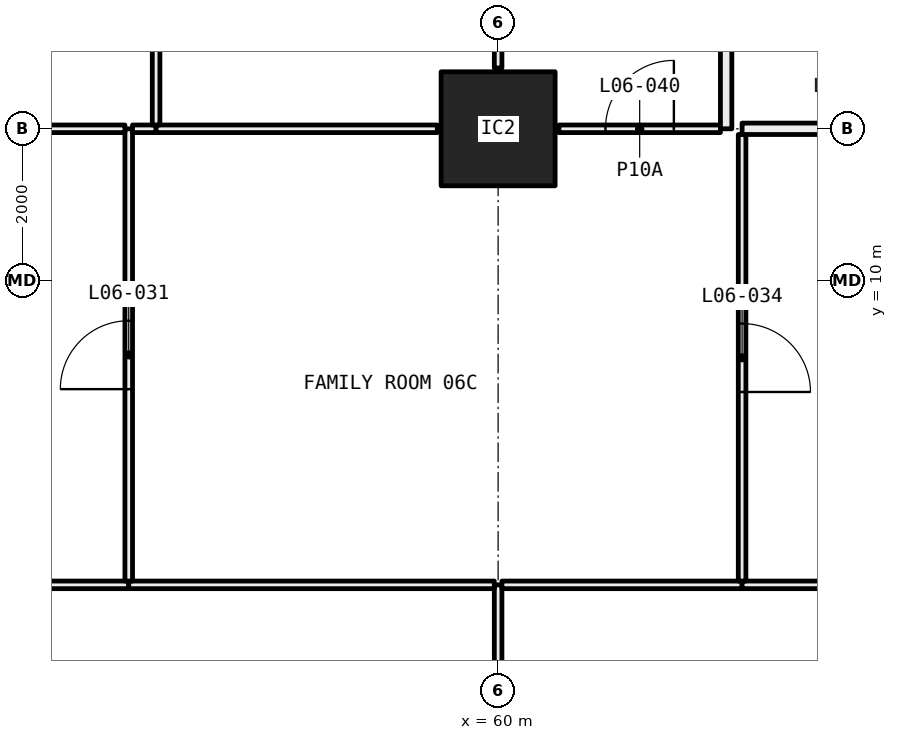
"""IFC4 building model, lengths in metres.
Left out: names, types, materials, properties, quantities, classifications, styles, units other than length and angle.
Written with IfcOpenShell. Run it as: python <this file> out.ifc"""

import sys

from ifc_helpers import new_model, si_unit, direction, frame, frame_2d, origin, origin_2d, place, context, subcontext, project, spatial, rectangle, hollow_rectangle, extrude, element, fill, save


model = new_model("IFC4")
c1 = context("Model", 3, precision=1e-05, world=origin(), true_north=direction((0.0, 1.0)))
c2 = subcontext(c1, "Body", "Model", "MODEL_VIEW")
j1 = project(units=[si_unit("LENGTHUNIT", "METRE"), si_unit("PLANEANGLEUNIT", "RADIAN")], contexts=[c1])
p1 = place(None, origin())
s1 = spatial("IfcSite", under=j1, at=p1, CompositionType="ELEMENT")
p2 = place(p1, origin())
s2 = spatial("IfcBuilding", under=s1, at=p2, CompositionType="ELEMENT")
p3 = place(p2, frame((0.0, 0.0, 33.45)))
s3 = spatial("IfcBuildingStorey", under=s2, at=p3, CompositionType="ELEMENT", Elevation=33.45)
p4 = place(p3, frame((60.0, 12.0, 0.0), z_axis=(0.0, 0.0, 1.0), x_axis=(1.0, 0.0, 0.0)))
e1 = element("IfcColumn", 1, at=p4, inside=s3, PredefinedType="COLUMN", context=c2, shape_type="SweptSolid", body=[
    extrude(hollow_rectangle(XDim=1.5, YDim=1.5, WallThickness=0.065, at=origin_2d()), origin(), (0.0, 0.0, 1.0), 3.05),
])
p5 = place(p3, frame((60.0, 0.72, 0.0), z_axis=(0.0, 0.0, 1.0), x_axis=(0.0, 1.0, 0.0)))
e2 = element("IfcWall", 2, at=p5, inside=s3, PredefinedType="PARTITIONING", context=c2, shape_type="SweptSolid", body=[
    extrude(rectangle(XDim=5.28, YDim=0.1, at=frame_2d((2.64, 0.0))), origin(), (0.0, 0.0, 1.0), 2.45),
])
p6 = place(p5, frame((2.19, 0.0, 0.0)))
e3 = element("IfcOpeningElement", 3, at=p6, cuts=e2, PredefinedType="OPENING", context=c2, shape_type="SweptSolid", body=[
    extrude(rectangle(XDim=0.9, YDim=2.1, at=frame_2d((0.45, 1.05))), frame((0.0, 0.06, 0.0), z_axis=(0.0, -1.0, 0.0), x_axis=(1.0, 0.0, 0.0)), (0.0, 0.0, 1.0), 0.12),
])
p7 = place(p3, frame((55.14, 6.0, 0.0), z_axis=(0.0, 0.0, 1.0), x_axis=(-1.0, 0.0, 0.0)))
e4 = element("IfcWall", 4, at=p7, inside=s3, PredefinedType="PARTITIONING", context=c2, shape_type="SweptSolid", body=[
    extrude(rectangle(XDim=7.09, YDim=0.1, at=frame_2d((3.545, 0.0))), origin(), (0.0, 0.0, 1.0), 2.45),
])
p8 = place(p7, frame((3.095, 0.0, 0.0)))
e5 = element("IfcOpeningElement", 5, at=p8, cuts=e4, PredefinedType="OPENING", context=c2, shape_type="SweptSolid", body=[
    extrude(rectangle(XDim=0.9, YDim=2.1, at=frame_2d((0.45, 1.05))), frame((0.0, 0.06, 0.0), z_axis=(0.0, -1.0, 0.0), x_axis=(1.0, 0.0, 0.0)), (0.0, 0.0, 1.0), 0.12),
])
p9 = place(p3, frame((59.95, 6.0, 0.0), z_axis=(0.0, 0.0, 1.0), x_axis=(-1.0, 0.0, 0.0)))
e6 = element("IfcWall", 6, at=p9, inside=s3, PredefinedType="PARTITIONING", context=c2, shape_type="SweptSolid", body=[
    extrude(rectangle(XDim=4.81, YDim=0.1, at=frame_2d((2.405, 0.0))), origin(), (0.0, 0.0, 1.0), 2.45),
])
p10 = place(p3, frame((63.21, 6.0, 0.0), z_axis=(0.0, 0.0, 1.0), x_axis=(-1.0, 0.0, 0.0)))
e7 = element("IfcWall", 7, at=p10, inside=s3, PredefinedType="PARTITIONING", context=c2, shape_type="SweptSolid", body=[
    extrude(rectangle(XDim=3.16, YDim=0.1, at=frame_2d((1.58, 0.0))), origin(), (0.0, 0.0, 1.0), 2.45),
])
p11 = place(p3, frame((65.28, 6.0, 0.0), z_axis=(0.0, 0.0, 1.0), x_axis=(-1.0, 0.0, 0.0)))
e8 = element("IfcWall", 8, at=p11, inside=s3, PredefinedType="PARTITIONING", context=c2, shape_type="SweptSolid", body=[
    extrude(rectangle(XDim=2.07, YDim=0.1, at=frame_2d((1.035, 0.0))), origin(), (0.0, 0.0, 1.0), 3.05),
])
p12 = place(p3, frame((55.14, 6.05, 0.0), z_axis=(0.0, 0.0, 1.0), x_axis=(0.0, 1.0, 0.0)))
e9 = element("IfcWall", 9, at=p12, inside=s3, PredefinedType="PARTITIONING", context=c2, shape_type="SweptSolid", body=[
    extrude(rectangle(XDim=5.95, YDim=0.1, at=frame_2d((2.975, 0.0))), origin(), (0.0, 0.0, 1.0), 2.45),
])
p13 = place(p12, frame((2.525, 0.0, 0.0)))
e10 = element("IfcOpeningElement", 10, at=p13, cuts=e9, PredefinedType="OPENING", context=c2, shape_type="SweptSolid", body=[
    extrude(rectangle(XDim=0.9, YDim=2.1, at=frame_2d((0.45, 1.05))), frame((0.0, 0.06, 0.0), z_axis=(0.0, -1.0, 0.0), x_axis=(1.0, 0.0, 0.0)), (0.0, 0.0, 1.0), 0.12),
])
p14 = place(p3, frame((55.09, 12.0, 0.0), z_axis=(0.0, 0.0, 1.0), x_axis=(-1.0, 0.0, 0.0)))
e11 = element("IfcWall", 11, at=p14, inside=s3, PredefinedType="PARTITIONING", context=c2, shape_type="SweptSolid", body=[
    extrude(rectangle(XDim=4.09, YDim=0.1, at=frame_2d((2.045, 0.0))), origin(), (0.0, 0.0, 1.0), 2.45),
])
p15 = place(p14, frame((1.595, 0.0, 0.0)))
e12 = element("IfcOpeningElement", 12, at=p15, cuts=e11, PredefinedType="OPENING", context=c2, shape_type="SweptSolid", body=[
    extrude(rectangle(XDim=0.9, YDim=2.1, at=frame_2d((0.45, 1.05))), frame((0.0, 0.06, 0.0), z_axis=(0.0, -1.0, 0.0), x_axis=(1.0, 0.0, 0.0)), (0.0, 0.0, 1.0), 0.12),
])
p16 = place(p3, frame((63.21, 6.05, 0.0), z_axis=(0.0, 0.0, 1.0), x_axis=(0.0, 1.0, 0.0)))
e13 = element("IfcWall", 13, at=p16, inside=s3, PredefinedType="PARTITIONING", context=c2, shape_type="SweptSolid", body=[
    extrude(rectangle(XDim=5.875, YDim=0.1, at=frame_2d((2.938, 0.0))), origin(), (0.0, 0.0, 1.0), 2.45),
])
p17 = place(p16, frame((2.488, 0.0, 0.0)))
e14 = element("IfcOpeningElement", 14, at=p17, cuts=e13, PredefinedType="OPENING", context=c2, shape_type="SweptSolid", body=[
    extrude(rectangle(XDim=0.9, YDim=2.1, at=frame_2d((0.45, 1.05))), frame((0.0, 0.06, 0.0), z_axis=(0.0, -1.0, 0.0), x_axis=(1.0, 0.0, 0.0)), (0.0, 0.0, 1.0), 0.12),
])
p18 = place(p3, frame((55.5, 12.0, 0.0), z_axis=(0.0, 0.0, 1.0), x_axis=(-1.0, 0.0, 0.0)))
e15 = element("IfcWall", 15, at=p18, inside=s3, PredefinedType="PARTITIONING", context=c2, shape_type="SweptSolid", body=[
    extrude(rectangle(XDim=0.31, YDim=0.1, at=frame_2d((0.155, 0.0))), origin(), (0.0, 0.0, 1.0), 2.45),
])
p19 = place(p3, frame((59.2, 12.0, 0.0), z_axis=(0.0, 0.0, 1.0), x_axis=(-1.0, 0.0, 0.0)))
e16 = element("IfcWall", 16, at=p19, inside=s3, PredefinedType="PARTITIONING", context=c2, shape_type="SweptSolid", body=[
    extrude(rectangle(XDim=3.7, YDim=0.1, at=frame_2d((1.85, 0.0))), origin(), (0.0, 0.0, 1.0), 2.45),
])
p20 = place(p3, frame((62.925, 12.0, 0.0), z_axis=(0.0, 0.0, 1.0), x_axis=(-1.0, 0.0, 0.0)))
e17 = element("IfcWall", 17, at=p20, inside=s3, PredefinedType="PARTITIONING", context=c2, shape_type="SweptSolid", body=[
    extrude(rectangle(XDim=2.125, YDim=0.1, at=frame_2d((1.062, 0.0))), origin(), (0.0, 0.0, 1.0), 2.45),
])
p21 = place(p20, frame((0.613, 0.0, 0.0)))
e18 = element("IfcOpeningElement", 18, at=p21, cuts=e17, PredefinedType="OPENING", context=c2, shape_type="SweptSolid", body=[
    extrude(rectangle(XDim=0.9, YDim=2.1, at=frame_2d((0.45, 1.05))), frame((0.0, 0.06, 0.0), z_axis=(0.0, -1.0, 0.0), x_axis=(1.0, 0.0, 0.0)), (0.0, 0.0, 1.0), 0.12),
])
p22 = place(p3, frame((66.146, 12.0, 0.0), z_axis=(0.0, 0.0, 1.0), x_axis=(-1.0, 0.0, 0.0)))
e19 = element("IfcWall", 19, at=p22, inside=s3, PredefinedType="PARTITIONING", context=c2, shape_type="SweptSolid", body=[
    extrude(rectangle(XDim=2.936, YDim=0.15, at=frame_2d((1.468, 0.0))), origin(), (0.0, 0.0, 1.0), 2.45),
])
p23 = place(p22, frame((1.018, 0.0, 0.0)))
e20 = element("IfcOpeningElement", 20, at=p23, cuts=e19, PredefinedType="OPENING", context=c2, shape_type="SweptSolid", body=[
    extrude(rectangle(XDim=0.9, YDim=2.1, at=frame_2d((0.45, 1.05))), frame((0.0, 0.085, 0.0), z_axis=(0.0, -1.0, 0.0), x_axis=(1.0, 0.0, 0.0)), (0.0, 0.0, 1.0), 0.17),
])
p24 = place(p3, frame((55.5, 12.05, 0.0), z_axis=(0.0, 0.0, 1.0), x_axis=(0.0, 1.0, 0.0)))
e21 = element("IfcWall", 21, at=p24, inside=s3, PredefinedType="PARTITIONING", context=c2, shape_type="SweptSolid", body=[
    extrude(rectangle(XDim=5.85, YDim=0.1, at=frame_2d((2.925, 0.0))), origin(), (0.0, 0.0, 1.0), 2.45),
])
p25 = place(p24, frame((2.475, 0.0, 0.0)))
e22 = element("IfcOpeningElement", 22, at=p25, cuts=e21, PredefinedType="OPENING", context=c2, shape_type="SweptSolid", body=[
    extrude(rectangle(XDim=0.9, YDim=2.1, at=frame_2d((0.45, 1.05))), frame((0.0, 0.06, 0.0), z_axis=(0.0, -1.0, 0.0), x_axis=(1.0, 0.0, 0.0)), (0.0, 0.0, 1.0), 0.12),
])
p26 = place(p3, frame((60.0, 12.8, 0.0), z_axis=(0.0, 0.0, 1.0), x_axis=(0.0, 1.0, 0.0)))
e23 = element("IfcWall", 23, at=p26, inside=s3, PredefinedType="PARTITIONING", context=c2, shape_type="SweptSolid", body=[
    extrude(rectangle(XDim=5.1, YDim=0.1, at=frame_2d((2.55, 0.0))), origin(), (0.0, 0.0, 1.0), 3.05),
])
p27 = place(p3, frame((63.0, 12.0, 0.0), z_axis=(0.0, 0.0, 1.0), x_axis=(0.0, 1.0, 0.0)))
e24 = element("IfcWall", 24, at=p27, inside=s3, PredefinedType="PARTITIONING", context=c2, shape_type="SweptSolid", body=[
    extrude(rectangle(XDim=3.814, YDim=0.15, at=frame_2d((1.907, 0.0))), origin(), (0.0, 0.0, 1.0), 2.45),
])
p28 = place(p13, origin())
e25 = element("IfcDoor", 25, at=p28, inside=s3, OperationType="SINGLE_SWING_RIGHT", PredefinedType="DOOR", context=c2, shape_type="SweptSolid", body=[
    extrude(rectangle(XDim=0.9, YDim=2.1, at=frame_2d((0.45, 1.05))), frame((0.0, 0.025, 0.0), z_axis=(0.0, -1.0, 0.0), x_axis=(1.0, 0.0, 0.0)), (0.0, 0.0, 1.0), 0.05),
])
fill(e10, e25)
p29 = place(p17, frame((0.9, 0.0, 0.0), x_axis=(-1.0, 0.0, 0.0)))
e26 = element("IfcDoor", 26, at=p29, inside=s3, OperationType="SINGLE_SWING_LEFT", PredefinedType="DOOR", context=c2, shape_type="SweptSolid", body=[
    extrude(rectangle(XDim=0.9, YDim=2.1, at=frame_2d((0.45, 1.05))), frame((0.0, 0.025, 0.0), z_axis=(0.0, -1.0, 0.0), x_axis=(1.0, 0.0, 0.0)), (0.0, 0.0, 1.0), 0.05),
])
fill(e14, e26)
p30 = place(p21, frame((0.9, 0.0, 0.0), x_axis=(-1.0, 0.0, 0.0)))
e27 = element("IfcDoor", 27, at=p30, inside=s3, OperationType="SINGLE_SWING_LEFT", PredefinedType="DOOR", context=c2, shape_type="SweptSolid", body=[
    extrude(rectangle(XDim=0.9, YDim=2.1, at=frame_2d((0.45, 1.05))), frame((0.0, 0.025, 0.0), z_axis=(0.0, -1.0, 0.0), x_axis=(1.0, 0.0, 0.0)), (0.0, 0.0, 1.0), 0.05),
])
fill(e18, e27)
save(model, sys.argv[1])
